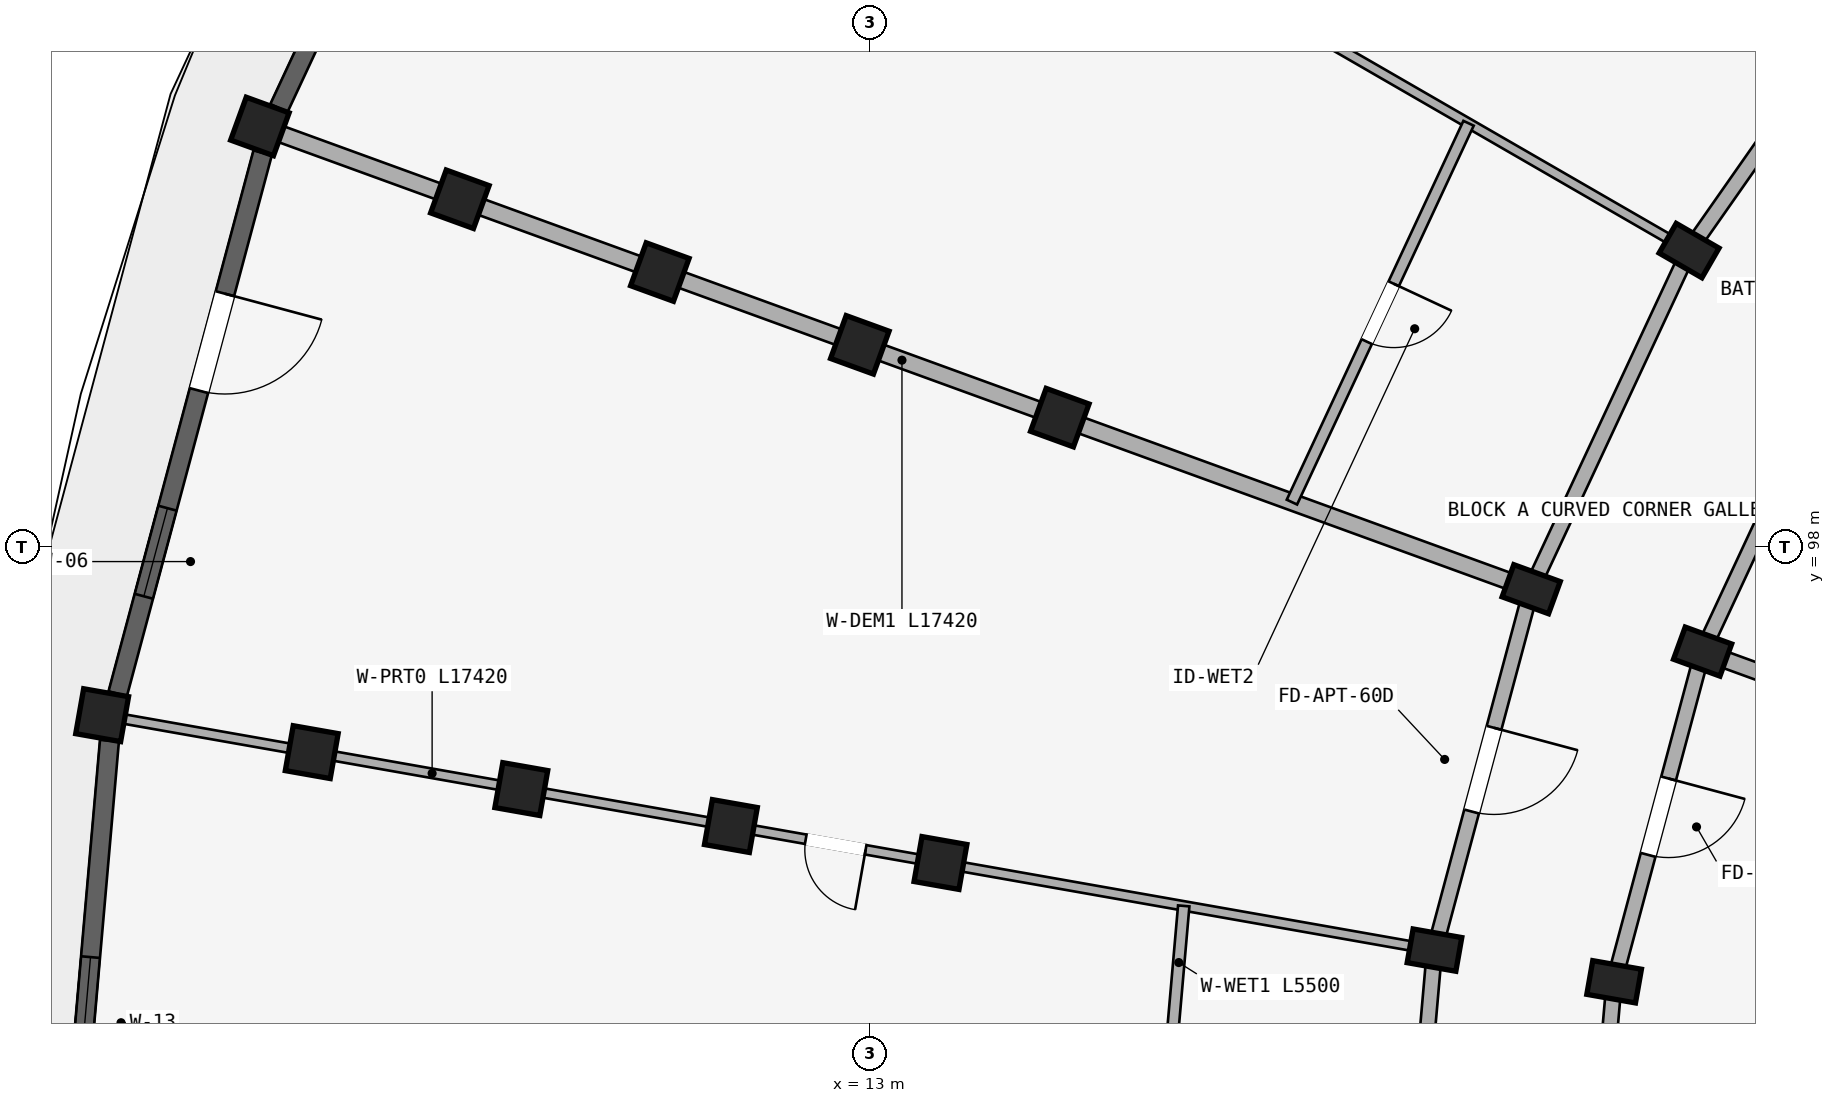
"""IFC4 building model, lengths in metres.
Left out: names, types, materials, properties, quantities, classifications, styles, units other than length and angle.
Written with IfcOpenShell. Run it as: python <this file> out.ifc"""

import sys

from ifc_helpers import new_model, si_unit, direction, frame, frame_2d, origin, origin_2d, place, context, subcontext, project, spatial, rectangle, extrude, element, fill, save


model = new_model("IFC4")
c1 = context("Model", 3, precision=1e-05, world=origin(), true_north=direction((0.0, 1.0)))
c2 = subcontext(c1, "Body", "Model", "MODEL_VIEW")
j1 = project(units=[si_unit("LENGTHUNIT", "METRE"), si_unit("PLANEANGLEUNIT", "RADIAN")], contexts=[c1])
p1 = place(None, origin())
s1 = spatial("IfcSite", under=j1, at=p1, CompositionType="ELEMENT")
p2 = place(p1, origin())
s2 = spatial("IfcBuilding", under=s1, at=p2, CompositionType="ELEMENT")
p3 = place(p2, frame((0.0, 0.0, 33.9)))
s3 = spatial("IfcBuildingStorey", under=s2, at=p3, CompositionType="ELEMENT", Elevation=33.9)
for number, where, z_axis, x_axis in (
    (1, (23.778, 101.9, 0.0), (0.0, 0.0, 1.0), (0.5, 0.866, 0.0)),
    (2, (23.956, 96.624, 0.0), (0.0, 0.0, 1.0), (0.342, 0.94, 0.0)),
    (3, (21.701, 97.445, 0.0), (0.0, 0.0, 1.0), (0.342, 0.94, 0.0)),
):
    element("IfcColumn", number, at=place(p3, frame(where, z_axis=z_axis, x_axis=x_axis)), inside=s3, PredefinedType="COLUMN", context=c2, shape_type="SweptSolid", body=[
        extrude(rectangle(XDim=0.45, YDim=0.65, at=origin_2d()), origin(), (0.0, 0.0, 1.0), 2.93),
    ])
for number, where, z_axis, x_axis in (
    (4, (15.499, 99.702, 0.0), (0.0, 0.0, 1.0), (0.342, 0.94, 0.0)),
    (5, (12.868, 100.66, 0.0), (0.0, 0.0, 1.0), (0.342, 0.94, 0.0)),
    (6, (10.236, 101.618, 0.0), (0.0, 0.0, 1.0), (0.342, 0.94, 0.0)),
    (7, (7.605, 102.575, 0.0), (0.0, 0.0, 1.0), (0.342, 0.94, 0.0)),
    (8, (4.974, 103.533, 0.0), (0.0, 0.0, 1.0), (0.342, 0.94, 0.0)),
):
    element("IfcColumn", number, at=place(p3, frame(where, z_axis=z_axis, x_axis=x_axis)), inside=s3, PredefinedType="COLUMN", context=c2, shape_type="SweptSolid", body=[
        extrude(rectangle(XDim=0.6, YDim=0.6, at=origin_2d()), origin(), (0.0, 0.0, 1.0), 2.93),
    ])
for number, where, z_axis, x_axis in (
    (9, (22.792, 92.28, 0.0), (0.0, 0.0, 1.0), (0.174, 0.985, 0.0)),
    (10, (20.428, 92.697, 0.0), (0.0, 0.0, 1.0), (0.174, 0.985, 0.0)),
):
    element("IfcColumn", number, at=place(p3, frame(where, z_axis=z_axis, x_axis=x_axis)), inside=s3, PredefinedType="COLUMN", context=c2, shape_type="SweptSolid", body=[
        extrude(rectangle(XDim=0.45, YDim=0.65, at=origin_2d()), origin(), (0.0, 0.0, 1.0), 2.93),
    ])
for number, where, z_axis, x_axis in (
    (11, (13.929, 93.843, 0.0), (0.0, 0.0, 1.0), (0.174, 0.985, 0.0)),
    (12, (11.171, 94.329, 0.0), (0.0, 0.0, 1.0), (0.174, 0.985, 0.0)),
    (13, (8.414, 94.815, 0.0), (0.0, 0.0, 1.0), (0.174, 0.985, 0.0)),
    (14, (5.656, 95.302, 0.0), (0.0, 0.0, 1.0), (0.174, 0.985, 0.0)),
    (15, (2.899, 95.788, 0.0), (0.0, 0.0, 1.0), (0.174, 0.985, 0.0)),
):
    element("IfcColumn", number, at=place(p3, frame(where, z_axis=z_axis, x_axis=x_axis)), inside=s3, PredefinedType="COLUMN", context=c2, shape_type="SweptSolid", body=[
        extrude(rectangle(XDim=0.6, YDim=0.6, at=origin_2d()), origin(), (0.0, 0.0, 1.0), 2.93),
    ])
p4 = place(p3, frame((26.598, 105.927, 0.0), z_axis=(0.0, 0.0, 1.0), x_axis=(-0.573592335331, -0.819140911474, 0.0)))
e16 = element("IfcWall", 16, at=p4, inside=s3, PredefinedType="STANDARD", context=c2, shape_type="SweptSolid", body=[
    extrude(rectangle(XDim=4.916, YDim=0.2, at=frame_2d((2.458, 0.0))), origin(), (0.0, 0.0, 1.0), 2.372),
])
p5 = place(p4, frame((1.918, 0.0, 0.0)))
e17 = element("IfcOpeningElement", 17, at=p5, cuts=e16, PredefinedType="OPENING", context=c2, shape_type="SweptSolid", body=[
    extrude(rectangle(XDim=1.08, YDim=2.15, at=frame_2d((0.54, 1.075))), frame((0.0, 0.11, 0.0), z_axis=(0.0, -1.0, 0.0), x_axis=(1.0, 0.0, 0.0)), (0.0, 0.0, 1.0), 0.22),
])
p6 = place(p3, frame((25.856, 100.7, 0.0), z_axis=(0.0, 0.0, 1.0), x_axis=(-0.422617978463, -0.906307919131, 0.0)))
e18 = element("IfcWall", 18, at=p6, inside=s3, PredefinedType="STANDARD", context=c2, shape_type="SweptSolid", body=[
    extrude(rectangle(XDim=4.497, YDim=0.2, at=frame_2d((2.249, 0.0))), origin(), (0.0, 0.0, 1.0), 2.372),
])
p7 = place(p3, frame((23.778, 101.9, 0.0), z_axis=(0.0, 0.0, 1.0), x_axis=(-0.422629854778, -0.906302381024, 0.0)))
e19 = element("IfcWall", 19, at=p7, inside=s3, PredefinedType="STANDARD", context=c2, shape_type="SweptSolid", body=[
    extrude(rectangle(XDim=4.915, YDim=0.2, at=frame_2d((2.458, 0.0))), origin(), (0.0, 0.0, 1.0), 2.372),
])
p8 = place(p3, frame((23.956, 96.624, 0.0), z_axis=(0.0, 0.0, 1.0), x_axis=(-0.258787642463, -0.965934240054, 0.0)))
e20 = element("IfcWall", 20, at=p8, inside=s3, PredefinedType="STANDARD", context=c2, shape_type="SweptSolid", body=[
    extrude(rectangle(XDim=4.497, YDim=0.2, at=frame_2d((2.249, 0.0))), origin(), (0.0, 0.0, 1.0), 2.372),
])
p9 = place(p8, frame((1.729, 0.0, 0.0)))
e21 = element("IfcOpeningElement", 21, at=p9, cuts=e20, PredefinedType="OPENING", context=c2, shape_type="SweptSolid", body=[
    extrude(rectangle(XDim=1.04, YDim=2.15, at=frame_2d((0.52, 1.075))), frame((0.0, 0.11, 0.0), z_axis=(0.0, -1.0, 0.0), x_axis=(1.0, 0.0, 0.0)), (0.0, 0.0, 1.0), 0.22),
])
p10 = place(p3, frame((21.701, 97.445, 0.0), z_axis=(0.0, 0.0, 1.0), x_axis=(-0.258803112091, -0.965930095386, 0.0)))
e22 = element("IfcWall", 22, at=p10, inside=s3, PredefinedType="STANDARD", context=c2, shape_type="SweptSolid", body=[
    extrude(rectangle(XDim=4.916, YDim=0.2, at=frame_2d((2.458, 0.0))), origin(), (0.0, 0.0, 1.0), 2.372),
])
p11 = place(p10, frame((1.888, 0.0, 0.0)))
e23 = element("IfcOpeningElement", 23, at=p11, cuts=e22, PredefinedType="OPENING", context=c2, shape_type="SweptSolid", body=[
    extrude(rectangle(XDim=1.14, YDim=2.15, at=frame_2d((0.57, 1.075))), frame((0.0, 0.11, 0.0), z_axis=(0.0, -1.0, 0.0), x_axis=(1.0, 0.0, 0.0)), (0.0, 0.0, 1.0), 0.22),
])
p12 = place(p3, frame((22.792, 92.28, 0.0), z_axis=(0.0, 0.0, 1.0), x_axis=(-0.087187153726, -0.996191949488, 0.0)))
e24 = element("IfcWall", 24, at=p12, inside=s3, PredefinedType="STANDARD", context=c2, shape_type="SweptSolid", body=[
    extrude(rectangle(XDim=4.497, YDim=0.2, at=frame_2d((2.249, 0.0))), origin(), (0.0, 0.0, 1.0), 2.372),
])
p13 = place(p3, frame((20.428, 92.697, 0.0), z_axis=(0.0, 0.0, 1.0), x_axis=(-0.087167566415, -0.996193663584, 0.0)))
e25 = element("IfcWall", 25, at=p13, inside=s3, PredefinedType="STANDARD", context=c2, shape_type="SweptSolid", body=[
    extrude(rectangle(XDim=4.916, YDim=0.2, at=frame_2d((2.458, 0.0))), origin(), (0.0, 0.0, 1.0), 2.372),
])
p14 = place(p3, frame((23.691, 101.95, 0.0), z_axis=(0.0, 0.0, 1.0), x_axis=(-0.866026648973, 0.499997843263, 0.0)))
e26 = element("IfcWall", 26, at=p14, inside=s3, PredefinedType="PARTITIONING", context=c2, shape_type="SweptSolid", body=[
    extrude(rectangle(XDim=17.42, YDim=0.125, at=frame_2d((8.71, 0.0))), origin(), (0.0, 0.0, 1.0), 2.372),
])
p15 = place(p14, frame((7.5, 0.0, 0.0)))
e27 = element("IfcOpeningElement", 27, at=p15, cuts=e26, PredefinedType="OPENING", context=c2, shape_type="SweptSolid", body=[
    extrude(rectangle(XDim=0.8, YDim=2.1, at=frame_2d((0.4, 1.05))), frame((0.0, 0.073, 0.0), z_axis=(0.0, -1.0, 0.0), x_axis=(1.0, 0.0, 0.0)), (0.0, 0.0, 1.0), 0.145),
])
p16 = place(p3, frame((30.346, 94.298, 0.0), z_axis=(0.0, 0.0, 1.0), x_axis=(-0.939696231917, 0.342010221662, 0.0)))
e28 = element("IfcWall", 28, at=p16, inside=s3, PredefinedType="STANDARD", context=c2, shape_type="SweptSolid", body=[
    extrude(rectangle(XDim=6.75, YDim=0.22, at=frame_2d((3.375, 0.0))), origin(), (0.0, 0.0, 1.0), 2.372),
])
p17 = place(p3, frame((21.607, 97.479, 0.0), z_axis=(0.0, 0.0, 1.0), x_axis=(-0.939691901159, 0.342022120477, 0.0)))
e29 = element("IfcWall", 29, at=p17, inside=s3, PredefinedType="STANDARD", context=c2, shape_type="SweptSolid", body=[
    extrude(rectangle(XDim=17.42, YDim=0.22, at=frame_2d((8.71, 0.0))), origin(), (0.0, 0.0, 1.0), 2.372),
])
p18 = place(p3, frame((20.33, 92.714, 0.0), z_axis=(0.0, 0.0, 1.0), x_axis=(-0.984808098809, 0.173646216546, 0.0)))
e30 = element("IfcWall", 30, at=p18, inside=s3, PredefinedType="PARTITIONING", context=c2, shape_type="SweptSolid", body=[
    extrude(rectangle(XDim=17.42, YDim=0.125, at=frame_2d((8.71, 0.0))), origin(), (0.0, 0.0, 1.0), 2.372),
])
p19 = place(p18, frame((7.5, 0.0, 0.0)))
e31 = element("IfcOpeningElement", 31, at=p19, cuts=e30, PredefinedType="OPENING", context=c2, shape_type="SweptSolid", body=[
    extrude(rectangle(XDim=0.8, YDim=2.1, at=frame_2d((0.4, 1.05))), frame((0.0, 0.073, 0.0), z_axis=(0.0, -1.0, 0.0), x_axis=(1.0, 0.0, 0.0)), (0.0, 0.0, 1.0), 0.145),
])
p20 = place(p3, frame((20.877, 103.575, 0.0), z_axis=(0.0, 0.0, 1.0), x_axis=(-0.422630264446, -0.906302189986, 0.0)))
e32 = element("IfcWall", 32, at=p20, inside=s3, PredefinedType="PLUMBINGWALL", context=c2, shape_type="SweptSolid", body=[
    extrude(rectangle(XDim=5.5, YDim=0.15, at=frame_2d((2.75, 0.0))), origin(), (0.0, 0.0, 1.0), 2.372),
])
p21 = place(p20, frame((2.33, 0.0, 0.0)))
e33 = element("IfcOpeningElement", 33, at=p21, cuts=e32, PredefinedType="OPENING", context=c2, shape_type="SweptSolid", body=[
    extrude(rectangle(XDim=0.84, YDim=2.1, at=frame_2d((0.42, 1.05))), frame((0.0, 0.085, 0.0), z_axis=(0.0, -1.0, 0.0), x_axis=(1.0, 0.0, 0.0)), (0.0, 0.0, 1.0), 0.17),
])
p22 = place(p3, frame((17.129, 93.279, 0.0), z_axis=(0.0, 0.0, 1.0), x_axis=(-0.087188978393, -0.996191789791, 0.0)))
e34 = element("IfcWall", 34, at=p22, inside=s3, PredefinedType="PLUMBINGWALL", context=c2, shape_type="SweptSolid", body=[
    extrude(rectangle(XDim=5.5, YDim=0.15, at=frame_2d((2.75, 0.0))), origin(), (0.0, 0.0, 1.0), 2.372),
])
p23 = place(p22, frame((2.35, 0.0, 0.0)))
e35 = element("IfcOpeningElement", 35, at=p23, cuts=e34, PredefinedType="OPENING", context=c2, shape_type="SweptSolid", body=[
    extrude(rectangle(XDim=0.8, YDim=2.1, at=frame_2d((0.4, 1.05))), frame((0.0, 0.085, 0.0), z_axis=(0.0, -1.0, 0.0), x_axis=(1.0, 0.0, 0.0)), (0.0, 0.0, 1.0), 0.17),
])
p24 = place(p3, frame((8.338, 110.452, 0.0), z_axis=(0.0, 0.0, 1.0), x_axis=(-0.422589730823, -0.906321090675, 0.0)))
e36 = element("IfcWall", 36, at=p24, inside=s3, PredefinedType="STANDARD", context=c2, shape_type="SweptSolid", body=[
    extrude(rectangle(XDim=7.367, YDim=0.25, at=frame_2d((3.684, 0.0))), origin(), (0.0, 0.0, 1.0), 2.472),
])
p25 = place(p24, frame((2.708, 0.0, 0.422)))
e37 = element("IfcOpeningElement", 37, at=p25, cuts=e36, PredefinedType="OPENING", context=c2, shape_type="SweptSolid", body=[
    extrude(rectangle(XDim=1.95, YDim=1.85, at=frame_2d((0.975, 0.925))), frame((0.0, 0.135, 0.0), z_axis=(0.0, -1.0, 0.0), x_axis=(1.0, 0.0, 0.0)), (0.0, 0.0, 1.0), 0.27),
])
p26 = place(p3, frame((5.01, 103.186, 0.0), z_axis=(0.0, 0.0, 1.0), x_axis=(-0.258821669831, -0.965925122991, 0.0)))
e38 = element("IfcWall", 38, at=p26, inside=s3, PredefinedType="STANDARD", context=c2, shape_type="SweptSolid", body=[
    extrude(rectangle(XDim=7.367, YDim=0.25, at=frame_2d((3.684, 0.0))), origin(), (0.0, 0.0, 1.0), 2.472),
])
p27 = place(p26, frame((4.84, 0.0, 0.622)))
e39 = element("IfcOpeningElement", 39, at=p27, cuts=e38, PredefinedType="OPENING", context=c2, shape_type="SweptSolid", body=[
    extrude(rectangle(XDim=1.2, YDim=1.5, at=frame_2d((0.6, 0.75))), frame((0.0, 0.135, 0.0), z_axis=(0.0, -1.0, 0.0), x_axis=(1.0, 0.0, 0.0)), (0.0, 0.0, 1.0), 0.27),
])
p28 = place(p26, frame((1.918, 0.0, 0.0)))
e40 = element("IfcOpeningElement", 40, at=p28, cuts=e38, PredefinedType="OPENING", context=c2, shape_type="SweptSolid", body=[
    extrude(rectangle(XDim=1.32, YDim=2.15, at=frame_2d((0.66, 1.075))), frame((0.0, 0.135, 0.0), z_axis=(0.0, -1.0, 0.0), x_axis=(1.0, 0.0, 0.0)), (0.0, 0.0, 1.0), 0.27),
])
p29 = place(p3, frame((2.995, 95.453, 0.0), z_axis=(0.0, 0.0, 1.0), x_axis=(-0.087122963287, -0.996197565379, 0.0)))
e41 = element("IfcWall", 41, at=p29, inside=s3, PredefinedType="STANDARD", context=c2, shape_type="SweptSolid", body=[
    extrude(rectangle(XDim=7.367, YDim=0.25, at=frame_2d((3.684, 0.0))), origin(), (0.0, 0.0, 1.0), 2.472),
])
p30 = place(p29, frame((2.858, 0.0, 0.522)))
e42 = element("IfcOpeningElement", 42, at=p30, cuts=e41, PredefinedType="OPENING", context=c2, shape_type="SweptSolid", body=[
    extrude(rectangle(XDim=1.65, YDim=1.75, at=frame_2d((0.825, 0.875))), frame((0.0, 0.135, 0.0), z_axis=(0.0, -1.0, 0.0), x_axis=(1.0, 0.0, 0.0)), (0.0, 0.0, 1.0), 0.27),
])
p31 = place(p27, origin())
e43 = element("IfcWindow", 43, at=p31, inside=s3, PartitioningType="SINGLE_PANEL", PredefinedType="WINDOW", context=c2, shape_type="SweptSolid", body=[
    extrude(rectangle(XDim=1.2, YDim=1.5, at=frame_2d((0.6, 0.75))), frame((0.0, 0.03, 0.0), z_axis=(0.0, -1.0, 0.0), x_axis=(1.0, 0.0, 0.0)), (0.0, 0.0, 1.0), 0.06),
])
fill(e39, e43)
p32 = place(p30, origin())
e44 = element("IfcWindow", 44, at=p32, inside=s3, PartitioningType="DOUBLE_PANEL_VERTICAL", PredefinedType="WINDOW", context=c2, shape_type="SweptSolid", body=[
    extrude(rectangle(XDim=1.65, YDim=1.75, at=frame_2d((0.825, 0.875))), frame((0.0, 0.03, 0.0), z_axis=(0.0, -1.0, 0.0), x_axis=(1.0, 0.0, 0.0)), (0.0, 0.0, 1.0), 0.06),
])
fill(e42, e44)
p33 = place(p19, frame((0.8, 0.0, 0.0), z_axis=(0.0, 0.0, 1.0), x_axis=(-1.0, 0.0, 0.0)))
e45 = element("IfcDoor", 45, at=p33, inside=s3, OperationType="SINGLE_SWING_RIGHT", PredefinedType="DOOR", context=c2, shape_type="SweptSolid", body=[
    extrude(rectangle(XDim=0.8, YDim=2.1, at=frame_2d((0.4, 1.05))), frame((0.0, 0.025, 0.0), z_axis=(0.0, -1.0, 0.0), x_axis=(1.0, 0.0, 0.0)), (0.0, 0.0, 1.0), 0.05),
])
fill(e31, e45)
p34 = place(p21, frame((0.84, 0.0, 0.0), z_axis=(0.0, 0.0, 1.0), x_axis=(-1.0, 0.0, 0.0)))
e46 = element("IfcDoor", 46, at=p34, inside=s3, OperationType="SINGLE_SWING_RIGHT", PredefinedType="DOOR", context=c2, shape_type="SweptSolid", body=[
    extrude(rectangle(XDim=0.84, YDim=2.1, at=frame_2d((0.42, 1.05))), frame((0.0, 0.025, 0.0), z_axis=(0.0, -1.0, 0.0), x_axis=(1.0, 0.0, 0.0)), (0.0, 0.0, 1.0), 0.05),
])
fill(e33, e46)
p35 = place(p11, origin())
e47 = element("IfcDoor", 47, at=p35, inside=s3, OperationType="SINGLE_SWING_LEFT", PredefinedType="DOOR", context=c2, shape_type="SweptSolid", body=[
    extrude(rectangle(XDim=1.14, YDim=2.15, at=frame_2d((0.57, 1.075))), frame((0.0, 0.025, 0.0), z_axis=(0.0, -1.0, 0.0), x_axis=(1.0, 0.0, 0.0)), (0.0, 0.0, 1.0), 0.05),
])
fill(e23, e47)
p36 = place(p9, frame((1.04, 0.0, 0.0), z_axis=(0.0, 0.0, 1.0), x_axis=(-1.0, 0.0, 0.0)))
e48 = element("IfcDoor", 48, at=p36, inside=s3, OperationType="SINGLE_SWING_RIGHT", PredefinedType="DOOR", context=c2, shape_type="SweptSolid", body=[
    extrude(rectangle(XDim=1.04, YDim=2.15, at=frame_2d((0.52, 1.075))), frame((0.0, 0.025, 0.0), z_axis=(0.0, -1.0, 0.0), x_axis=(1.0, 0.0, 0.0)), (0.0, 0.0, 1.0), 0.05),
])
fill(e21, e48)
p37 = place(p28, frame((1.32, 0.0, 0.0), z_axis=(0.0, 0.0, 1.0), x_axis=(-1.0, 0.0, 0.0)))
e49 = element("IfcDoor", 49, at=p37, inside=s3, OperationType="SINGLE_SWING_RIGHT", PredefinedType="DOOR", context=c2, shape_type="SweptSolid", body=[
    extrude(rectangle(XDim=1.32, YDim=2.15, at=frame_2d((0.66, 1.075))), frame((0.0, 0.025, 0.0), z_axis=(0.0, -1.0, 0.0), x_axis=(1.0, 0.0, 0.0)), (0.0, 0.0, 1.0), 0.05),
])
fill(e40, e49)
save(model, sys.argv[1])
